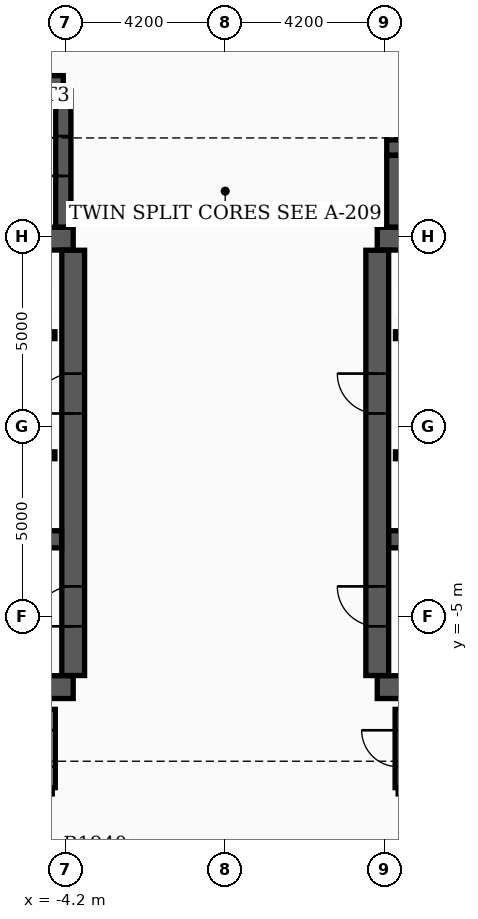
"""IFC4 building model, lengths in metres.
Left out: names, types, materials, properties, quantities, classifications, styles, units other than length and angle.
Written with IfcOpenShell. Run it as: python <this file> out.ifc"""

import sys

from ifc_helpers import new_model, si_unit, direction, frame, frame_2d, origin, place, context, subcontext, project, spatial, rectangle, extrude, element, fill, save


model = new_model("IFC4")
c1 = context("Model", 3, precision=1e-05, world=origin(), true_north=direction((0.0, 1.0)))
c2 = subcontext(c1, "Body", "Model", "MODEL_VIEW")
j1 = project(units=[si_unit("LENGTHUNIT", "METRE"), si_unit("PLANEANGLEUNIT", "RADIAN")], contexts=[c1])
p1 = place(None, origin())
s1 = spatial("IfcSite", under=j1, at=p1, CompositionType="ELEMENT")
p2 = place(p1, origin())
s2 = spatial("IfcBuilding", under=s1, at=p2, CompositionType="ELEMENT")
p3 = place(p2, frame((0.0, 0.0, 124.2)))
s3 = spatial("IfcBuildingStorey", under=s2, at=p3, CompositionType="ELEMENT", Elevation=124.2)
for number, where, z_axis, x_axis in (
    (1, (-12.4, -6.85, 0.0), (0.0, 0.0, 1.0), (1.0, 0.0, 0.0)),
    (2, (-12.4, 4.95, 0.0), (0.0, 0.0, 1.0), (1.0, 0.0, 0.0)),
):
    element("IfcWall", number, at=place(p3, frame(where, z_axis=z_axis, x_axis=x_axis)), inside=s3, PredefinedType="SHEAR", context=c2, shape_type="SweptSolid", body=[
        extrude(rectangle(XDim=8.4, YDim=0.6, at=frame_2d((4.2, 0.0))), origin(), (0.0, 0.0, 1.0), 3.7),
    ])
p4 = place(p3, frame((-4.0, -6.545, 0.0), z_axis=(0.0, 0.0, 1.0), x_axis=(0.0, 1.0, 0.0)))
e3 = element("IfcWall", 3, at=p4, inside=s3, PredefinedType="SHEAR", context=c2, shape_type="SweptSolid", body=[
    extrude(rectangle(XDim=11.19, YDim=0.6, at=frame_2d((5.595, 0.0))), origin(), (0.0, 0.0, 1.0), 3.7),
])
p5 = place(p4, frame((1.295, 0.0, 0.0)))
e4 = element("IfcOpeningElement", 4, at=p5, cuts=e3, PredefinedType="OPENING", context=c2, shape_type="SweptSolid", body=[
    extrude(rectangle(XDim=1.05, YDim=2.15, at=frame_2d((0.525, 1.075))), frame((0.0, 0.31, 0.0), z_axis=(0.0, -1.0, 0.0), x_axis=(1.0, 0.0, 0.0)), (0.0, 0.0, 1.0), 0.62),
])
p6 = place(p4, frame((6.895, 0.0, 0.0)))
e5 = element("IfcOpeningElement", 5, at=p6, cuts=e3, PredefinedType="OPENING", context=c2, shape_type="SweptSolid", body=[
    extrude(rectangle(XDim=1.05, YDim=2.15, at=frame_2d((0.525, 1.075))), frame((0.0, 0.31, 0.0), z_axis=(0.0, -1.0, 0.0), x_axis=(1.0, 0.0, 0.0)), (0.0, 0.0, 1.0), 0.62),
])
p7 = place(p3, frame((-12.095, -2.96, 0.0), z_axis=(0.0, 0.0, 1.0), x_axis=(1.0, 0.0, 0.0)))
e6 = element("IfcWall", 6, at=p7, inside=s3, PredefinedType="SHEAR", context=c2, shape_type="SweptSolid", body=[
    extrude(rectangle(XDim=7.79, YDim=0.45, at=frame_2d((3.895, 0.0))), origin(), (0.0, 0.0, 1.0), 3.7),
])
for number, where, z_axis, x_axis in (
    (7, (4.0, -6.85, 0.0), (0.0, 0.0, 1.0), (1.0, 0.0, 0.0)),
    (8, (4.0, 4.95, 0.0), (0.0, 0.0, 1.0), (1.0, 0.0, 0.0)),
):
    element("IfcWall", number, at=place(p3, frame(where, z_axis=z_axis, x_axis=x_axis)), inside=s3, PredefinedType="SHEAR", context=c2, shape_type="SweptSolid", body=[
        extrude(rectangle(XDim=8.4, YDim=0.6, at=frame_2d((4.2, 0.0))), origin(), (0.0, 0.0, 1.0), 3.7),
    ])
p8 = place(p3, frame((4.0, -6.545, 0.0), z_axis=(0.0, 0.0, 1.0), x_axis=(0.0, 1.0, 0.0)))
e9 = element("IfcWall", 9, at=p8, inside=s3, PredefinedType="SHEAR", context=c2, shape_type="SweptSolid", body=[
    extrude(rectangle(XDim=11.19, YDim=0.6, at=frame_2d((5.595, 0.0))), origin(), (0.0, 0.0, 1.0), 3.7),
])
p9 = place(p8, frame((1.295, 0.0, 0.0)))
e10 = element("IfcOpeningElement", 10, at=p9, cuts=e9, PredefinedType="OPENING", context=c2, shape_type="SweptSolid", body=[
    extrude(rectangle(XDim=1.05, YDim=2.15, at=frame_2d((0.525, 1.075))), frame((0.0, 0.31, 0.0), z_axis=(0.0, -1.0, 0.0), x_axis=(1.0, 0.0, 0.0)), (0.0, 0.0, 1.0), 0.62),
])
p10 = place(p8, frame((6.895, 0.0, 0.0)))
e11 = element("IfcOpeningElement", 11, at=p10, cuts=e9, PredefinedType="OPENING", context=c2, shape_type="SweptSolid", body=[
    extrude(rectangle(XDim=1.05, YDim=2.15, at=frame_2d((0.525, 1.075))), frame((0.0, 0.31, 0.0), z_axis=(0.0, -1.0, 0.0), x_axis=(1.0, 0.0, 0.0)), (0.0, 0.0, 1.0), 0.62),
])
p11 = place(p3, frame((4.305, -2.96, 0.0), z_axis=(0.0, 0.0, 1.0), x_axis=(1.0, 0.0, 0.0)))
e12 = element("IfcWall", 12, at=p11, inside=s3, PredefinedType="SHEAR", context=c2, shape_type="SweptSolid", body=[
    extrude(rectangle(XDim=7.79, YDim=0.45, at=frame_2d((3.895, 0.0))), origin(), (0.0, 0.0, 1.0), 3.7),
])
p12 = place(p3, frame((-12.22, 9.04, 0.0), z_axis=(0.0, 0.0, 1.0), x_axis=(1.0, 0.0, 0.0)))
e13 = element("IfcWall", 13, at=p12, inside=s3, PredefinedType="SHEAR", context=c2, shape_type="SweptSolid", body=[
    extrude(rectangle(XDim=7.96, YDim=0.4, at=frame_2d((3.98, 0.0))), origin(), (0.0, 0.0, 1.0), 3.7),
])
p13 = place(p3, frame((-4.26, 5.255, 0.0), z_axis=(0.0, 0.0, 1.0), x_axis=(0.0, 1.0, 0.0)))
e14 = element("IfcWall", 14, at=p13, inside=s3, PredefinedType="SHEAR", context=c2, shape_type="SweptSolid", body=[
    extrude(rectangle(XDim=3.58, YDim=0.4, at=frame_2d((1.79, 0.0))), origin(), (0.0, 0.0, 1.0), 3.7),
])
p14 = place(p13, frame((1.345, 0.0, 0.0)))
e15 = element("IfcOpeningElement", 15, at=p14, cuts=e14, PredefinedType="OPENING", context=c2, shape_type="SweptSolid", body=[
    extrude(rectangle(XDim=1.05, YDim=2.15, at=frame_2d((0.525, 1.075))), frame((0.0, 0.21, 0.0), z_axis=(0.0, -1.0, 0.0), x_axis=(1.0, 0.0, 0.0)), (0.0, 0.0, 1.0), 0.42),
])
p15 = place(p3, frame((4.45, 5.255, 0.0), z_axis=(0.0, 0.0, 1.0), x_axis=(0.0, 1.0, 0.0)))
e16 = element("IfcWall", 16, at=p15, inside=s3, PredefinedType="SHEAR", context=c2, shape_type="SweptSolid", body=[
    extrude(rectangle(XDim=1.885, YDim=0.4, at=frame_2d((0.942, 0.0))), origin(), (0.0, 0.0, 1.0), 3.7),
])
p16 = place(p3, frame((4.25, 7.35, 0.0), z_axis=(0.0, 0.0, 1.0), x_axis=(1.0, 0.0, 0.0)))
e17 = element("IfcWall", 17, at=p16, inside=s3, PredefinedType="SHEAR", context=c2, shape_type="SweptSolid", body=[
    extrude(rectangle(XDim=5.4, YDim=0.4, at=frame_2d((2.7, 0.0))), origin(), (0.0, 0.0, 1.0), 3.7),
])
p17 = place(p3, frame((-11.9, 2.41, 0.0), z_axis=(0.0, 0.0, 1.0), x_axis=(1.0, 0.0, 0.0)))
e18 = element("IfcWall", 18, at=p17, inside=s3, PredefinedType="SOLIDWALL", context=c2, shape_type="SweptSolid", body=[
    extrude(rectangle(XDim=7.42, YDim=0.18, at=frame_2d((3.71, 0.0))), origin(), (0.0, 0.0, 1.0), 2.96),
])
p18 = place(p17, frame((0.55, 0.0, 0.0)))
e19 = element("IfcOpeningElement", 19, at=p18, cuts=e18, PredefinedType="OPENING", context=c2, shape_type="SweptSolid", body=[
    extrude(rectangle(XDim=1.1, YDim=2.15, at=frame_2d((0.55, 1.075))), frame((0.0, 0.1, 0.0), z_axis=(0.0, -1.0, 0.0), x_axis=(1.0, 0.0, 0.0)), (0.0, 0.0, 1.0), 0.2),
])
p19 = place(p17, frame((4.9, 0.0, 0.0)))
e20 = element("IfcOpeningElement", 20, at=p19, cuts=e18, PredefinedType="OPENING", context=c2, shape_type="SweptSolid", body=[
    extrude(rectangle(XDim=0.88, YDim=2.1, at=frame_2d((0.44, 1.05))), frame((0.0, 0.1, 0.0), z_axis=(0.0, -1.0, 0.0), x_axis=(1.0, 0.0, 0.0)), (0.0, 0.0, 1.0), 0.2),
])
p20 = place(p3, frame((4.48, 2.41, 0.0), z_axis=(0.0, 0.0, 1.0), x_axis=(1.0, 0.0, 0.0)))
e21 = element("IfcWall", 21, at=p20, inside=s3, PredefinedType="SOLIDWALL", context=c2, shape_type="SweptSolid", body=[
    extrude(rectangle(XDim=7.42, YDim=0.18, at=frame_2d((3.71, 0.0))), origin(), (0.0, 0.0, 1.0), 2.96),
])
p21 = place(p20, frame((5.67, 0.0, 0.0)))
e22 = element("IfcOpeningElement", 22, at=p21, cuts=e21, PredefinedType="OPENING", context=c2, shape_type="SweptSolid", body=[
    extrude(rectangle(XDim=1.1, YDim=2.15, at=frame_2d((0.55, 1.075))), frame((0.0, 0.1, 0.0), z_axis=(0.0, -1.0, 0.0), x_axis=(1.0, 0.0, 0.0)), (0.0, 0.0, 1.0), 0.2),
])
p22 = place(p20, frame((1.6, 0.0, 0.0)))
e23 = element("IfcOpeningElement", 23, at=p22, cuts=e21, PredefinedType="OPENING", context=c2, shape_type="SweptSolid", body=[
    extrude(rectangle(XDim=0.88, YDim=2.1, at=frame_2d((0.44, 1.05))), frame((0.0, 0.1, 0.0), z_axis=(0.0, -1.0, 0.0), x_axis=(1.0, 0.0, 0.0)), (0.0, 0.0, 1.0), 0.2),
])
p23 = place(p3, frame((-11.9, -0.75, 0.0), z_axis=(0.0, 0.0, 1.0), x_axis=(1.0, 0.0, 0.0)))
e24 = element("IfcWall", 24, at=p23, inside=s3, PredefinedType="SOLIDWALL", context=c2, shape_type="SweptSolid", body=[
    extrude(rectangle(XDim=7.42, YDim=0.18, at=frame_2d((3.71, 0.0))), origin(), (0.0, 0.0, 1.0), 2.96),
])
p24 = place(p23, frame((0.45, 0.0, 0.0)))
e25 = element("IfcOpeningElement", 25, at=p24, cuts=e24, PredefinedType="OPENING", context=c2, shape_type="SweptSolid", body=[
    extrude(rectangle(XDim=1.1, YDim=2.15, at=frame_2d((0.55, 1.075))), frame((0.0, 0.1, 0.0), z_axis=(0.0, -1.0, 0.0), x_axis=(1.0, 0.0, 0.0)), (0.0, 0.0, 1.0), 0.2),
])
p25 = place(p23, frame((2.35, 0.0, 0.0)))
e26 = element("IfcOpeningElement", 26, at=p25, cuts=e24, PredefinedType="OPENING", context=c2, shape_type="SweptSolid", body=[
    extrude(rectangle(XDim=1.1, YDim=2.15, at=frame_2d((0.55, 1.075))), frame((0.0, 0.1, 0.0), z_axis=(0.0, -1.0, 0.0), x_axis=(1.0, 0.0, 0.0)), (0.0, 0.0, 1.0), 0.2),
])
p26 = place(p3, frame((4.48, -0.75, 0.0), z_axis=(0.0, 0.0, 1.0), x_axis=(1.0, 0.0, 0.0)))
e27 = element("IfcWall", 27, at=p26, inside=s3, PredefinedType="SOLIDWALL", context=c2, shape_type="SweptSolid", body=[
    extrude(rectangle(XDim=7.42, YDim=0.18, at=frame_2d((3.71, 0.0))), origin(), (0.0, 0.0, 1.0), 2.96),
])
p27 = place(p26, frame((0.52, 0.0, 0.0)))
e28 = element("IfcOpeningElement", 28, at=p27, cuts=e27, PredefinedType="OPENING", context=c2, shape_type="SweptSolid", body=[
    extrude(rectangle(XDim=1.1, YDim=2.15, at=frame_2d((0.55, 1.075))), frame((0.0, 0.1, 0.0), z_axis=(0.0, -1.0, 0.0), x_axis=(1.0, 0.0, 0.0)), (0.0, 0.0, 1.0), 0.2),
])
p28 = place(p3, frame((4.55, -9.58, 0.0), z_axis=(0.0, 0.0, 1.0), x_axis=(1.0, 0.0, 0.0)))
e29 = element("IfcWall", 29, at=p28, inside=s3, PredefinedType="PARTITIONING", context=c2, shape_type="SweptSolid", body=[
    extrude(rectangle(XDim=8.1, YDim=0.16, at=frame_2d((4.05, 0.0))), origin(), (0.0, 0.0, 1.0), 2.96),
])
p29 = place(p3, frame((4.55, -9.495, 0.0), z_axis=(0.0, 0.0, 1.0), x_axis=(0.0, 1.0, 0.0)))
e30 = element("IfcWall", 30, at=p29, inside=s3, PredefinedType="PARTITIONING", context=c2, shape_type="SweptSolid", body=[
    extrude(rectangle(XDim=2.06, YDim=0.16, at=frame_2d((1.03, 0.0))), origin(), (0.0, 0.0, 1.0), 2.96),
])
p30 = place(p29, frame((0.55, 0.0, 0.0)))
e31 = element("IfcOpeningElement", 31, at=p30, cuts=e30, PredefinedType="OPENING", context=c2, shape_type="SweptSolid", body=[
    extrude(rectangle(XDim=0.96, YDim=2.15, at=frame_2d((0.48, 1.075))), frame((0.0, 0.09, 0.0), z_axis=(0.0, -1.0, 0.0), x_axis=(1.0, 0.0, 0.0)), (0.0, 0.0, 1.0), 0.18),
])
p31 = place(p3, frame((-4.55, -9.495, 0.0), z_axis=(0.0, 0.0, 1.0), x_axis=(0.0, 1.0, 0.0)))
e32 = element("IfcWall", 32, at=p31, inside=s3, PredefinedType="PARTITIONING", context=c2, shape_type="SweptSolid", body=[
    extrude(rectangle(XDim=2.06, YDim=0.16, at=frame_2d((1.03, 0.0))), origin(), (0.0, 0.0, 1.0), 2.96),
])
p32 = place(p31, frame((0.55, 0.0, 0.0)))
e33 = element("IfcOpeningElement", 33, at=p32, cuts=e32, PredefinedType="OPENING", context=c2, shape_type="SweptSolid", body=[
    extrude(rectangle(XDim=0.96, YDim=2.15, at=frame_2d((0.48, 1.075))), frame((0.0, 0.09, 0.0), z_axis=(0.0, -1.0, 0.0), x_axis=(1.0, 0.0, 0.0)), (0.0, 0.0, 1.0), 0.18),
])
p33 = place(p5, origin())
e34 = element("IfcDoor", 34, at=p33, inside=s3, OperationType="SINGLE_SWING_LEFT", PredefinedType="DOOR", context=c2, shape_type="SweptSolid", body=[
    extrude(rectangle(XDim=1.05, YDim=2.15, at=frame_2d((0.525, 1.075))), frame((0.0, 0.025, 0.0), z_axis=(0.0, -1.0, 0.0), x_axis=(1.0, 0.0, 0.0)), (0.0, 0.0, 1.0), 0.05),
])
fill(e4, e34)
p34 = place(p9, origin())
e35 = element("IfcDoor", 35, at=p34, inside=s3, OperationType="SINGLE_SWING_RIGHT", PredefinedType="DOOR", context=c2, shape_type="SweptSolid", body=[
    extrude(rectangle(XDim=1.05, YDim=2.15, at=frame_2d((0.525, 1.075))), frame((0.0, 0.025, 0.0), z_axis=(0.0, -1.0, 0.0), x_axis=(1.0, 0.0, 0.0)), (0.0, 0.0, 1.0), 0.05),
])
fill(e10, e35)
p35 = place(p6, origin())
e36 = element("IfcDoor", 36, at=p35, inside=s3, OperationType="SINGLE_SWING_LEFT", PredefinedType="DOOR", context=c2, shape_type="SweptSolid", body=[
    extrude(rectangle(XDim=1.05, YDim=2.15, at=frame_2d((0.525, 1.075))), frame((0.0, 0.025, 0.0), z_axis=(0.0, -1.0, 0.0), x_axis=(1.0, 0.0, 0.0)), (0.0, 0.0, 1.0), 0.05),
])
fill(e5, e36)
p36 = place(p10, origin())
e37 = element("IfcDoor", 37, at=p36, inside=s3, OperationType="SINGLE_SWING_RIGHT", PredefinedType="DOOR", context=c2, shape_type="SweptSolid", body=[
    extrude(rectangle(XDim=1.05, YDim=2.15, at=frame_2d((0.525, 1.075))), frame((0.0, 0.025, 0.0), z_axis=(0.0, -1.0, 0.0), x_axis=(1.0, 0.0, 0.0)), (0.0, 0.0, 1.0), 0.05),
])
fill(e11, e37)
p37 = place(p14, origin())
e38 = element("IfcDoor", 38, at=p37, inside=s3, OperationType="SINGLE_SWING_LEFT", PredefinedType="DOOR", context=c2, shape_type="SweptSolid", body=[
    extrude(rectangle(XDim=1.05, YDim=2.15, at=frame_2d((0.525, 1.075))), frame((0.0, 0.025, 0.0), z_axis=(0.0, -1.0, 0.0), x_axis=(1.0, 0.0, 0.0)), (0.0, 0.0, 1.0), 0.05),
])
fill(e15, e38)
p38 = place(p30, origin())
e39 = element("IfcDoor", 39, at=p38, inside=s3, OperationType="SINGLE_SWING_RIGHT", PredefinedType="DOOR", context=c2, shape_type="SweptSolid", body=[
    extrude(rectangle(XDim=0.96, YDim=2.15, at=frame_2d((0.48, 1.075))), frame((0.0, 0.025, 0.0), z_axis=(0.0, -1.0, 0.0), x_axis=(1.0, 0.0, 0.0)), (0.0, 0.0, 1.0), 0.05),
])
fill(e31, e39)
p39 = place(p32, origin())
e40 = element("IfcDoor", 40, at=p39, inside=s3, OperationType="SINGLE_SWING_LEFT", PredefinedType="DOOR", context=c2, shape_type="SweptSolid", body=[
    extrude(rectangle(XDim=0.96, YDim=2.15, at=frame_2d((0.48, 1.075))), frame((0.0, 0.025, 0.0), z_axis=(0.0, -1.0, 0.0), x_axis=(1.0, 0.0, 0.0)), (0.0, 0.0, 1.0), 0.05),
])
fill(e33, e40)
save(model, sys.argv[1])
